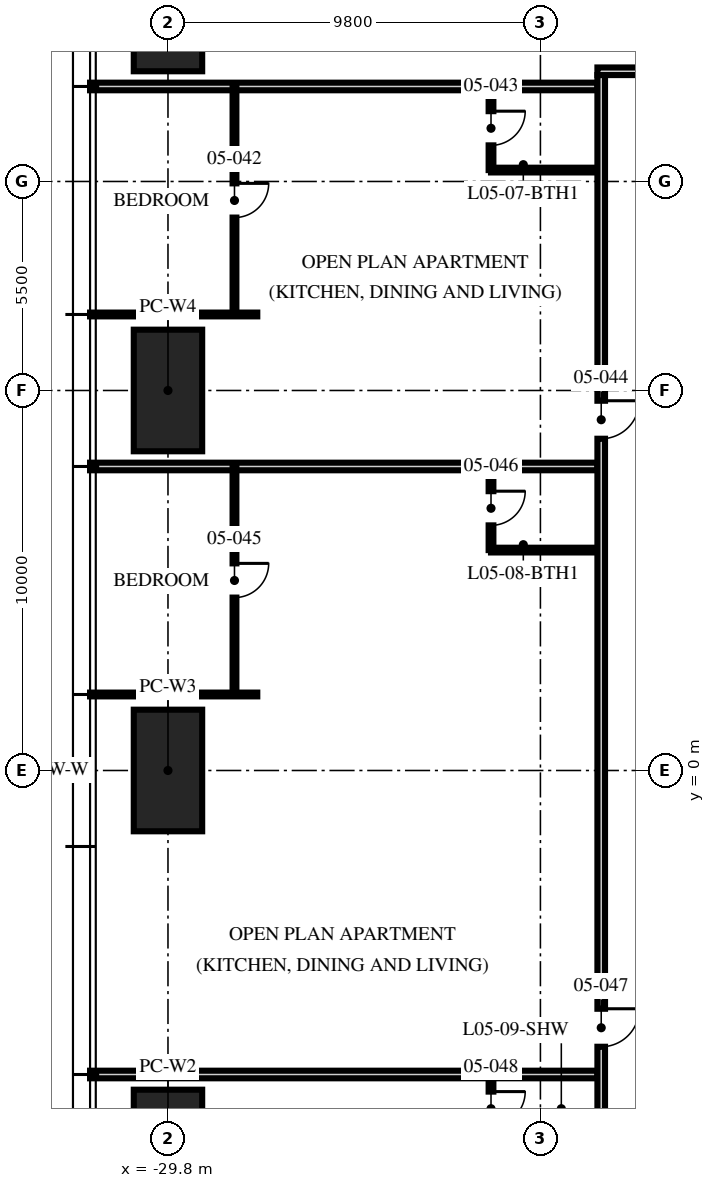
"""IFC4 building model, lengths in metres.
Left out: names, types, materials, properties, quantities, classifications, styles, units other than length and angle.
Written with IfcOpenShell. Run it as: python <this file> out.ifc"""

import sys

from ifc_helpers import new_model, si_unit, direction, frame, frame_2d, origin, origin_2d, place, context, subcontext, project, spatial, rectangle, hollow_rectangle, extrude, element, fill, save


model = new_model("IFC4")
c1 = context("Model", 3, precision=1e-05, world=origin(), true_north=direction((0.0, 1.0)))
c2 = subcontext(c1, "Body", "Model", "MODEL_VIEW")
j1 = project(units=[si_unit("LENGTHUNIT", "METRE"), si_unit("PLANEANGLEUNIT", "RADIAN")], contexts=[c1])
p1 = place(None, origin())
s1 = spatial("IfcSite", under=j1, at=p1, CompositionType="ELEMENT")
p2 = place(p1, origin())
s2 = spatial("IfcBuilding", under=s1, at=p2, CompositionType="ELEMENT")
p3 = place(p2, frame((0.0, 0.0, 24.75)))
s3 = spatial("IfcBuildingStorey", under=s2, at=p3, CompositionType="ELEMENT", Elevation=24.75)
for number, where, z_axis, x_axis in (
    (1, (-29.8, -10.0, 0.0), (0.0, 0.0, 1.0), (0.0, 1.0, 0.0)),
    (2, (-29.8, 0.0, 0.0), (0.0, 0.0, 1.0), (0.0, 1.0, 0.0)),
    (3, (-29.8, 10.0, 0.0), (0.0, 0.0, 1.0), (0.0, 1.0, 0.0)),
    (4, (-29.8, 20.0, 0.0), (0.0, 0.0, 1.0), (0.0, 1.0, 0.0)),
):
    element("IfcColumn", number, at=place(p3, frame(where, z_axis=z_axis, x_axis=x_axis)), inside=s3, PredefinedType="COLUMN", context=c2, shape_type="SweptSolid", body=[
        extrude(hollow_rectangle(XDim=3.2, YDim=1.8, WallThickness=0.2, at=origin_2d()), origin(), (0.0, 0.0, 1.0), 3.75),
    ])
p4 = place(p3, frame((-18.5, 18.0, 0.0), z_axis=(0.0, 0.0, 1.0), x_axis=(-1.0, 0.0, 0.0)))
e5 = element("IfcWall", 5, at=p4, inside=s3, PredefinedType="PARTITIONING", context=c2, shape_type="SweptSolid", body=[
    extrude(rectangle(XDim=13.35, YDim=0.2, at=frame_2d((6.675, 0.0))), origin(), (0.0, 0.0, 1.0), 2.3),
])
p5 = place(p3, frame((-27.45, 12.0, 0.0), z_axis=(0.0, 0.0, 1.0), x_axis=(-1.0, 0.0, 0.0)))
e6 = element("IfcWall", 6, at=p5, inside=s3, PredefinedType="PARTITIONING", context=c2, shape_type="SweptSolid", body=[
    extrude(rectangle(XDim=4.4, YDim=0.1, at=frame_2d((2.2, 0.0))), origin(), (0.0, 0.0, 1.0), 2.71),
])
p6 = place(p3, frame((-18.5, 8.0, 0.0), z_axis=(0.0, 0.0, 1.0), x_axis=(-1.0, 0.0, 0.0)))
e7 = element("IfcWall", 7, at=p6, inside=s3, PredefinedType="PARTITIONING", context=c2, shape_type="SweptSolid", body=[
    extrude(rectangle(XDim=13.35, YDim=0.2, at=frame_2d((6.675, 0.0))), origin(), (0.0, 0.0, 1.0), 2.71),
])
p7 = place(p3, frame((-27.45, 2.0, 0.0), z_axis=(0.0, 0.0, 1.0), x_axis=(-1.0, 0.0, 0.0)))
e8 = element("IfcWall", 8, at=p7, inside=s3, PredefinedType="PARTITIONING", context=c2, shape_type="SweptSolid", body=[
    extrude(rectangle(XDim=4.4, YDim=0.1, at=frame_2d((2.2, 0.0))), origin(), (0.0, 0.0, 1.0), 2.71),
])
p8 = place(p3, frame((-18.5, -8.0, 0.0), z_axis=(0.0, 0.0, 1.0), x_axis=(-1.0, 0.0, 0.0)))
e9 = element("IfcWall", 9, at=p8, inside=s3, PredefinedType="PARTITIONING", context=c2, shape_type="SweptSolid", body=[
    extrude(rectangle(XDim=13.35, YDim=0.2, at=frame_2d((6.675, 0.0))), origin(), (0.0, 0.0, 1.0), 2.71),
])
p9 = place(p3, frame((-28.05, 18.0, 0.0), z_axis=(0.0, 0.0, 1.0), x_axis=(0.0, -1.0, 0.0)))
e10 = element("IfcWall", 10, at=p9, inside=s3, PredefinedType="PARTITIONING", context=c2, shape_type="SweptSolid", body=[
    extrude(rectangle(XDim=6.0, YDim=0.1, at=frame_2d((3.0, 0.0))), origin(), (0.0, 0.0, 1.0), 2.61),
])
p10 = place(p9, frame((2.55, 0.0, 0.0)))
e11 = element("IfcOpeningElement", 11, at=p10, cuts=e10, PredefinedType="OPENING", context=c2, shape_type="SweptSolid", body=[
    extrude(rectangle(XDim=0.9, YDim=2.1, at=frame_2d((0.45, 1.05))), frame((0.0, 0.06, 0.0), z_axis=(0.0, -1.0, 0.0), x_axis=(1.0, 0.0, 0.0)), (0.0, 0.0, 1.0), 0.12),
])
p11 = place(p3, frame((-21.3, 18.0, 0.0), z_axis=(0.0, 0.0, 1.0), x_axis=(0.0, -1.0, 0.0)))
e12 = element("IfcWall", 12, at=p11, inside=s3, PredefinedType="PARTITIONING", context=c2, shape_type="SweptSolid", body=[
    extrude(rectangle(XDim=2.2, YDim=0.125, at=frame_2d((1.1, 0.0))), origin(), (0.0, 0.0, 1.0), 3.5),
])
p12 = place(p11, frame((0.65, 0.0, 0.0)))
e13 = element("IfcOpeningElement", 13, at=p12, cuts=e12, PredefinedType="OPENING", context=c2, shape_type="SweptSolid", body=[
    extrude(rectangle(XDim=0.9, YDim=2.1, at=frame_2d((0.45, 1.05))), frame((0.0, 0.073, 0.0), z_axis=(0.0, -1.0, 0.0), x_axis=(1.0, 0.0, 0.0)), (0.0, 0.0, 1.0), 0.145),
])
p13 = place(p3, frame((-18.5, 15.8, 0.0), z_axis=(0.0, 0.0, 1.0), x_axis=(-1.0, 0.0, 0.0)))
e14 = element("IfcWall", 14, at=p13, inside=s3, PredefinedType="PARTITIONING", context=c2, shape_type="SweptSolid", body=[
    extrude(rectangle(XDim=2.8, YDim=0.125, at=frame_2d((1.4, 0.0))), origin(), (0.0, 0.0, 1.0), 3.5),
])
p14 = place(p3, frame((-28.05, 8.0, 0.0), z_axis=(0.0, 0.0, 1.0), x_axis=(0.0, -1.0, 0.0)))
e15 = element("IfcWall", 15, at=p14, inside=s3, PredefinedType="PARTITIONING", context=c2, shape_type="SweptSolid", body=[
    extrude(rectangle(XDim=6.0, YDim=0.1, at=frame_2d((3.0, 0.0))), origin(), (0.0, 0.0, 1.0), 2.61),
])
p15 = place(p14, frame((2.55, 0.0, 0.0)))
e16 = element("IfcOpeningElement", 16, at=p15, cuts=e15, PredefinedType="OPENING", context=c2, shape_type="SweptSolid", body=[
    extrude(rectangle(XDim=0.9, YDim=2.1, at=frame_2d((0.45, 1.05))), frame((0.0, 0.06, 0.0), z_axis=(0.0, -1.0, 0.0), x_axis=(1.0, 0.0, 0.0)), (0.0, 0.0, 1.0), 0.12),
])
p16 = place(p3, frame((-21.3, 8.0, 0.0), z_axis=(0.0, 0.0, 1.0), x_axis=(0.0, -1.0, 0.0)))
e17 = element("IfcWall", 17, at=p16, inside=s3, PredefinedType="PARTITIONING", context=c2, shape_type="SweptSolid", body=[
    extrude(rectangle(XDim=2.2, YDim=0.125, at=frame_2d((1.1, 0.0))), origin(), (0.0, 0.0, 1.0), 3.5),
])
p17 = place(p16, frame((0.65, 0.0, 0.0)))
e18 = element("IfcOpeningElement", 18, at=p17, cuts=e17, PredefinedType="OPENING", context=c2, shape_type="SweptSolid", body=[
    extrude(rectangle(XDim=0.9, YDim=2.1, at=frame_2d((0.45, 1.05))), frame((0.0, 0.073, 0.0), z_axis=(0.0, -1.0, 0.0), x_axis=(1.0, 0.0, 0.0)), (0.0, 0.0, 1.0), 0.145),
])
p18 = place(p3, frame((-18.5, 5.8, 0.0), z_axis=(0.0, 0.0, 1.0), x_axis=(-1.0, 0.0, 0.0)))
e19 = element("IfcWall", 19, at=p18, inside=s3, PredefinedType="PARTITIONING", context=c2, shape_type="SweptSolid", body=[
    extrude(rectangle(XDim=2.8, YDim=0.125, at=frame_2d((1.4, 0.0))), origin(), (0.0, 0.0, 1.0), 3.5),
])
p19 = place(p3, frame((-21.3, -8.0, 0.0), z_axis=(0.0, 0.0, 1.0), x_axis=(0.0, -1.0, 0.0)))
e20 = element("IfcWall", 20, at=p19, inside=s3, PredefinedType="PARTITIONING", context=c2, shape_type="SweptSolid", body=[
    extrude(rectangle(XDim=1.8, YDim=0.125, at=frame_2d((0.9, 0.0))), origin(), (0.0, 0.0, 1.0), 3.5),
])
p20 = place(p19, frame((0.45, 0.0, 0.0)))
e21 = element("IfcOpeningElement", 21, at=p20, cuts=e20, PredefinedType="OPENING", context=c2, shape_type="SweptSolid", body=[
    extrude(rectangle(XDim=0.9, YDim=2.1, at=frame_2d((0.45, 1.05))), frame((0.0, 0.073, 0.0), z_axis=(0.0, -1.0, 0.0), x_axis=(1.0, 0.0, 0.0)), (0.0, 0.0, 1.0), 0.145),
])
p21 = place(p3, frame((-18.5, 18.4, 0.0), z_axis=(0.0, 0.0, 1.0), x_axis=(1.0, 0.0, 0.0)))
e22 = element("IfcWall", 22, at=p21, inside=s3, PredefinedType="PARTITIONING", context=c2, shape_type="SweptSolid", body=[
    extrude(rectangle(XDim=8.5, YDim=0.2, at=frame_2d((4.25, 0.0))), origin(), (0.0, 0.0, 1.0), 2.3),
])
p22 = place(p3, frame((-18.4, 18.3, 0.0), z_axis=(0.0, 0.0, 1.0), x_axis=(0.0, -1.0, 0.0)))
e23 = element("IfcWall", 23, at=p22, inside=s3, PredefinedType="PARTITIONING", context=c2, shape_type="SweptSolid", body=[
    extrude(rectangle(XDim=36.6, YDim=0.2, at=frame_2d((18.3, 0.0))), origin(), (0.0, 0.0, 1.0), 2.3),
])
p23 = place(p22, frame((8.57, 0.0, 0.0)))
e24 = element("IfcOpeningElement", 24, at=p23, cuts=e23, PredefinedType="OPENING", context=c2, shape_type="SweptSolid", body=[
    extrude(rectangle(XDim=1.0, YDim=2.2, at=frame_2d((0.5, 1.1))), frame((0.0, 0.11, 0.0), z_axis=(0.0, -1.0, 0.0), x_axis=(1.0, 0.0, 0.0)), (0.0, 0.0, 1.0), 0.22),
])
p24 = place(p22, frame((24.57, 0.0, 0.0)))
e25 = element("IfcOpeningElement", 25, at=p24, cuts=e23, PredefinedType="OPENING", context=c2, shape_type="SweptSolid", body=[
    extrude(rectangle(XDim=1.0, YDim=2.2, at=frame_2d((0.5, 1.1))), frame((0.0, 0.11, 0.0), z_axis=(0.0, -1.0, 0.0), x_axis=(1.0, 0.0, 0.0)), (0.0, 0.0, 1.0), 0.22),
])
p25 = place(p22, frame((28.87, 0.0, 0.0)))
e26 = element("IfcOpeningElement", 26, at=p25, cuts=e23, PredefinedType="OPENING", context=c2, shape_type="SweptSolid", body=[
    extrude(rectangle(XDim=1.0, YDim=2.2, at=frame_2d((0.5, 1.1))), frame((0.0, 0.11, 0.0), z_axis=(0.0, -1.0, 0.0), x_axis=(1.0, 0.0, 0.0)), (0.0, 0.0, 1.0), 0.22),
])
p26 = place(p22, frame((34.82, 0.0, 0.0)))
e27 = element("IfcOpeningElement", 27, at=p26, cuts=e23, PredefinedType="OPENING", context=c2, shape_type="SweptSolid", body=[
    extrude(rectangle(XDim=1.0, YDim=2.2, at=frame_2d((0.5, 1.1))), frame((0.0, 0.11, 0.0), z_axis=(0.0, -1.0, 0.0), x_axis=(1.0, 0.0, 0.0)), (0.0, 0.0, 1.0), 0.22),
])
p27 = place(p10, origin())
e28 = element("IfcDoor", 28, at=p27, inside=s3, OperationType="SINGLE_SWING_LEFT", PredefinedType="DOOR", context=c2, shape_type="SweptSolid", body=[
    extrude(rectangle(XDim=0.9, YDim=2.1, at=frame_2d((0.45, 1.05))), frame((0.0, 0.025, 0.0), z_axis=(0.0, -1.0, 0.0), x_axis=(1.0, 0.0, 0.0)), (0.0, 0.0, 1.0), 0.05),
])
fill(e11, e28)
p28 = place(p12, origin())
e29 = element("IfcDoor", 29, at=p28, inside=s3, OperationType="SINGLE_SWING_LEFT", PredefinedType="DOOR", context=c2, shape_type="SweptSolid", body=[
    extrude(rectangle(XDim=0.9, YDim=2.1, at=frame_2d((0.45, 1.05))), frame((0.0, 0.025, 0.0), z_axis=(0.0, -1.0, 0.0), x_axis=(1.0, 0.0, 0.0)), (0.0, 0.0, 1.0), 0.05),
])
fill(e13, e29)
p29 = place(p23, origin())
e30 = element("IfcDoor", 30, at=p29, inside=s3, OperationType="SINGLE_SWING_LEFT", PredefinedType="DOOR", context=c2, shape_type="SweptSolid", body=[
    extrude(rectangle(XDim=1.0, YDim=2.2, at=frame_2d((0.5, 1.1))), frame((0.0, 0.025, 0.0), z_axis=(0.0, -1.0, 0.0), x_axis=(1.0, 0.0, 0.0)), (0.0, 0.0, 1.0), 0.05),
])
fill(e24, e30)
p30 = place(p15, origin())
e31 = element("IfcDoor", 31, at=p30, inside=s3, OperationType="SINGLE_SWING_LEFT", PredefinedType="DOOR", context=c2, shape_type="SweptSolid", body=[
    extrude(rectangle(XDim=0.9, YDim=2.1, at=frame_2d((0.45, 1.05))), frame((0.0, 0.025, 0.0), z_axis=(0.0, -1.0, 0.0), x_axis=(1.0, 0.0, 0.0)), (0.0, 0.0, 1.0), 0.05),
])
fill(e16, e31)
p31 = place(p17, origin())
e32 = element("IfcDoor", 32, at=p31, inside=s3, OperationType="SINGLE_SWING_LEFT", PredefinedType="DOOR", context=c2, shape_type="SweptSolid", body=[
    extrude(rectangle(XDim=0.9, YDim=2.1, at=frame_2d((0.45, 1.05))), frame((0.0, 0.025, 0.0), z_axis=(0.0, -1.0, 0.0), x_axis=(1.0, 0.0, 0.0)), (0.0, 0.0, 1.0), 0.05),
])
fill(e18, e32)
p32 = place(p24, origin())
e33 = element("IfcDoor", 33, at=p32, inside=s3, OperationType="SINGLE_SWING_LEFT", PredefinedType="DOOR", context=c2, shape_type="SweptSolid", body=[
    extrude(rectangle(XDim=1.0, YDim=2.2, at=frame_2d((0.5, 1.1))), frame((0.0, 0.025, 0.0), z_axis=(0.0, -1.0, 0.0), x_axis=(1.0, 0.0, 0.0)), (0.0, 0.0, 1.0), 0.05),
])
fill(e25, e33)
p33 = place(p20, origin())
e34 = element("IfcDoor", 34, at=p33, inside=s3, OperationType="SINGLE_SWING_LEFT", PredefinedType="DOOR", context=c2, shape_type="SweptSolid", body=[
    extrude(rectangle(XDim=0.9, YDim=2.1, at=frame_2d((0.45, 1.05))), frame((0.0, 0.025, 0.0), z_axis=(0.0, -1.0, 0.0), x_axis=(1.0, 0.0, 0.0)), (0.0, 0.0, 1.0), 0.05),
])
fill(e21, e34)
save(model, sys.argv[1])
